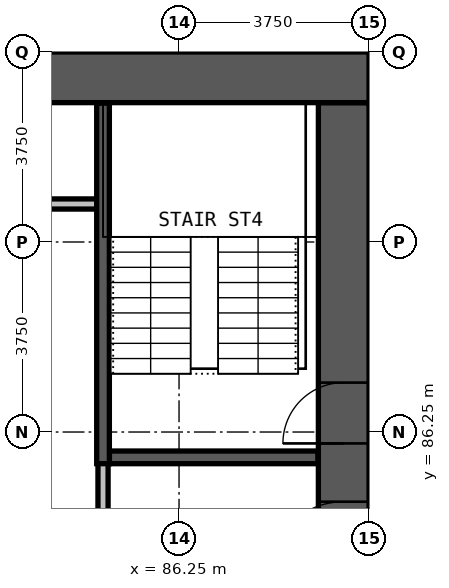
"""IFC4 building model, lengths in metres.
Left out: names, types, materials, properties, quantities, classifications, styles, units other than length and angle.
Written with IfcOpenShell. Run it as: python <this file> out.ifc"""

import sys

from ifc_helpers import new_model, si_unit, direction, frame, frame_2d, origin, place, context, subcontext, project, spatial, rectangle, extrude, element, fill, save


model = new_model("IFC4")
c1 = context("Model", 3, precision=1e-05, world=origin(), true_north=direction((0.0, 1.0)))
c2 = subcontext(c1, "Body", "Model", "MODEL_VIEW")
j1 = project(units=[si_unit("LENGTHUNIT", "METRE"), si_unit("PLANEANGLEUNIT", "RADIAN")], contexts=[c1])
p1 = place(None, origin())
s1 = spatial("IfcSite", under=j1, at=p1, CompositionType="ELEMENT")
p2 = place(p1, origin())
s2 = spatial("IfcBuilding", under=s1, at=p2, CompositionType="ELEMENT")
p3 = place(p2, frame((0.0, 0.0, 46.1)))
s3 = spatial("IfcBuildingStorey", under=s2, at=p3, CompositionType="ELEMENT", Elevation=46.1)
p4 = place(p3, frame((89.5, 72.25, 0.0), z_axis=(0.0, 0.0, 1.0), x_axis=(0.0, 1.0, 0.0)))
e1 = element("IfcWall", 1, at=p4, inside=s3, PredefinedType="SHEAR", context=c2, shape_type="SweptSolid", body=[
    extrude(rectangle(XDim=20.5, YDim=1.0, at=frame_2d((10.25, 0.0))), origin(), (0.0, 0.0, 1.0), 3.3),
])
p5 = place(p4, frame((0.275, 0.0, 0.0)))
e2 = element("IfcOpeningElement", 2, at=p5, cuts=e1, PredefinedType="OPENING", context=c2, shape_type="SweptSolid", body=[
    extrude(rectangle(XDim=1.2, YDim=2.2, at=frame_2d((0.6, 1.1))), frame((0.0, 0.51, 0.0), z_axis=(0.0, -1.0, 0.0), x_axis=(1.0, 0.0, 0.0)), (0.0, 0.0, 1.0), 1.02),
])
p6 = place(p4, frame((13.775, 0.0, 0.0)))
e3 = element("IfcOpeningElement", 3, at=p6, cuts=e1, PredefinedType="OPENING", context=c2, shape_type="SweptSolid", body=[
    extrude(rectangle(XDim=1.2, YDim=2.2, at=frame_2d((0.6, 1.1))), frame((0.0, 0.51, 0.0), z_axis=(0.0, -1.0, 0.0), x_axis=(1.0, 0.0, 0.0)), (0.0, 0.0, 1.0), 1.02),
])
p7 = place(p4, frame((7.875, 0.0, 0.0)))
e4 = element("IfcOpeningElement", 4, at=p7, cuts=e1, PredefinedType="OPENING", context=c2, shape_type="SweptSolid", body=[
    extrude(rectangle(XDim=1.5, YDim=2.2, at=frame_2d((0.75, 1.1))), frame((0.0, 0.51, 0.0), z_axis=(0.0, -1.0, 0.0), x_axis=(1.0, 0.0, 0.0)), (0.0, 0.0, 1.0), 1.02),
])
p8 = place(p4, frame((11.125, 0.0, 0.0)))
e5 = element("IfcOpeningElement", 5, at=p8, cuts=e1, PredefinedType="OPENING", context=c2, shape_type="SweptSolid", body=[
    extrude(rectangle(XDim=1.5, YDim=2.2, at=frame_2d((0.75, 1.1))), frame((0.0, 0.51, 0.0), z_axis=(0.0, -1.0, 0.0), x_axis=(1.0, 0.0, 0.0)), (0.0, 0.0, 1.0), 1.02),
])
p9 = place(p3, frame((90.0, 93.25, 0.0), z_axis=(0.0, 0.0, 1.0), x_axis=(-1.0, 0.0, 0.0)))
e6 = element("IfcWall", 6, at=p9, inside=s3, PredefinedType="SHEAR", context=c2, shape_type="SweptSolid", body=[
    extrude(rectangle(XDim=30.0, YDim=1.0, at=frame_2d((15.0, 0.0))), origin(), (0.0, 0.0, 1.0), 3.3),
])
p10 = place(p3, frame((75.26, 90.75, 0.0), z_axis=(0.0, 0.0, 1.0), x_axis=(1.0, 0.0, 0.0)))
e7 = element("IfcWall", 7, at=p10, inside=s3, PredefinedType="PARTITIONING", context=c2, shape_type="SweptSolid", body=[
    extrude(rectangle(XDim=9.365, YDim=0.2, at=frame_2d((4.683, 0.0))), origin(), (0.0, 0.0, 1.0), 3.0),
])
p11 = place(p3, frame((84.75, 84.4, 0.0), z_axis=(0.0, 0.0, 1.0), x_axis=(0.0, 1.0, 0.0)))
e8 = element("IfcWall", 8, at=p11, inside=s3, PredefinedType="PARTITIONING", context=c2, shape_type="SweptSolid", body=[
    extrude(rectangle(XDim=1.475, YDim=0.2, at=frame_2d((0.738, 0.0))), origin(), (0.0, 0.0, 1.0), 3.0),
])
p12 = place(p3, frame((84.875, 85.75, 0.0), z_axis=(0.0, 0.0, 1.0), x_axis=(1.0, 0.0, 0.0)))
e9 = element("IfcWall", 9, at=p12, inside=s3, PredefinedType="PARTITIONING", context=c2, shape_type="SweptSolid", body=[
    extrude(rectangle(XDim=4.115, YDim=0.25, at=frame_2d((2.058, 0.0))), origin(), (0.0, 0.0, 1.0), 3.0),
])
p13 = place(p3, frame((84.75, 85.625, 0.0), z_axis=(0.0, 0.0, 1.0), x_axis=(0.0, 1.0, 0.0)))
e10 = element("IfcWall", 10, at=p13, inside=s3, PredefinedType="PARTITIONING", context=c2, shape_type="SweptSolid", body=[
    extrude(rectangle(XDim=7.115, YDim=0.25, at=frame_2d((3.558, 0.0))), origin(), (0.0, 0.0, 1.0), 3.0),
])
p14 = place(p6, origin())
e11 = element("IfcDoor", 11, at=p14, inside=s3, OperationType="SINGLE_SWING_LEFT", PredefinedType="DOOR", context=c2, shape_type="SweptSolid", body=[
    extrude(rectangle(XDim=1.2, YDim=2.2, at=frame_2d((0.6, 1.1))), frame((0.0, 0.025, 0.0), z_axis=(0.0, -1.0, 0.0), x_axis=(1.0, 0.0, 0.0)), (0.0, 0.0, 1.0), 0.05),
])
fill(e3, e11)
p15 = place(p8, origin())
e12 = element("IfcDoor", 12, at=p15, inside=s3, OperationType="DOUBLE_DOOR_SINGLE_SWING", PredefinedType="DOOR", context=c2, shape_type="SweptSolid", body=[
    extrude(rectangle(XDim=1.5, YDim=2.2, at=frame_2d((0.75, 1.1))), frame((0.0, 0.025, 0.0), z_axis=(0.0, -1.0, 0.0), x_axis=(1.0, 0.0, 0.0)), (0.0, 0.0, 1.0), 0.05),
])
fill(e5, e12)
save(model, sys.argv[1])
